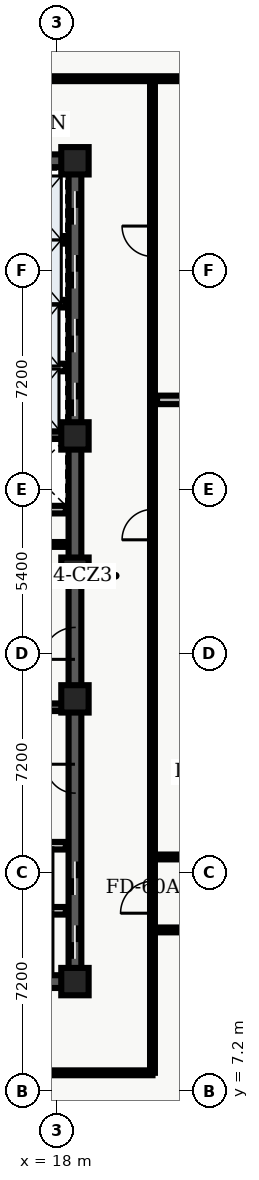
"""IFC4 building model, lengths in metres.
Left out: names, types, materials, properties, quantities, classifications, styles, units other than length and angle.
Written with IfcOpenShell. Run it as: python <this file> out.ifc"""

import sys

from ifc_helpers import new_model, entity, si_unit, converted_unit, direction, frame, origin_with_axes, origin_2d_with_axis, place, context, subcontext, project, spatial, polyline, rectangle, outline, extrude, element, fill, save


model = new_model("IFC4")
c1 = context("Model", 3, precision=1e-05, world=origin_with_axes(), true_north=direction((0.0, 1.0)))
c2 = subcontext(c1, "Body", "Model", "MODEL_VIEW")
j1 = project(units=[si_unit("LENGTHUNIT", "METRE"), converted_unit("PLANEANGLEUNIT", "DEGREE", entity("IfcPlaneAngleMeasure", 0.017), si_unit("PLANEANGLEUNIT", "RADIAN"), dimensions=[0, 0, 0, 0, 0, 0, 0])], contexts=[c1])
p1 = place(None, origin_with_axes())
s1 = spatial("IfcSite", under=j1, at=p1, CompositionType="ELEMENT")
p2 = place(p1, origin_with_axes())
s2 = spatial("IfcBuilding", under=s1, at=p2, CompositionType="ELEMENT")
p3 = place(p2, frame((0.0, 0.0, 219.9), z_axis=(0.0, 0.0, 1.0), x_axis=(1.0, 0.0, 0.0)))
s3 = spatial("IfcBuildingStorey", under=s2, at=p3, CompositionType="ELEMENT", Elevation=219.9)
p4 = place(p3, frame((11.4, 10.8, 0.0), z_axis=(0.0, 0.0, 1.0), x_axis=(1.0, 0.0, 0.0)))
e1 = element("IfcWall", 1, at=p4, inside=s3, PredefinedType="SHEAR", context=c2, shape_type="SweptSolid", body=[
    extrude(outline(polyline([(0.0, -0.21), (7.2, -0.21), (7.2, 0.21), (0.0, 0.21), (0.0, -0.21)])), origin_with_axes(), (0.0, 0.0, 1.0), 4.56),
])
p5 = place(p4, frame((2.625, 0.0, 0.0), z_axis=(0.0, 0.0, 1.0), x_axis=(1.0, 0.0, 0.0)))
e2 = element("IfcOpeningElement", 2, at=p5, cuts=e1, PredefinedType="OPENING", context=c2, shape_type="SweptSolid", body=[
    extrude(rectangle(XDim=1.05, YDim=0.44, at=origin_2d_with_axis()), origin_with_axes(), (0.0, 0.0, 1.0), 2.15),
])
p6 = place(p3, frame((11.4, 37.8, 0.0), z_axis=(0.0, 0.0, 1.0), x_axis=(1.0, 0.0, 0.0)))
e3 = element("IfcWall", 3, at=p6, inside=s3, PredefinedType="SHEAR", context=c2, shape_type="SweptSolid", body=[
    extrude(outline(polyline([(0.0, -0.21), (7.2, -0.21), (7.2, 0.21), (0.0, 0.21), (0.0, -0.21)])), origin_with_axes(), (0.0, 0.0, 1.0), 4.56),
])
p7 = place(p6, frame((2.625, 0.0, 0.0), z_axis=(0.0, 0.0, 1.0), x_axis=(1.0, 0.0, 0.0)))
e4 = element("IfcOpeningElement", 4, at=p7, cuts=e3, PredefinedType="OPENING", context=c2, shape_type="SweptSolid", body=[
    extrude(rectangle(XDim=1.05, YDim=0.44, at=origin_2d_with_axis()), origin_with_axes(), (0.0, 0.0, 1.0), 2.15),
])
p8 = place(p3, frame((18.6, 10.8, 0.0), z_axis=(0.0, 0.0, 1.0), x_axis=(0.0, 1.0, 0.0)))
e5 = element("IfcWall", 5, at=p8, inside=s3, PredefinedType="SHEAR", context=c2, shape_type="SweptSolid", body=[
    extrude(outline(polyline([(0.0, -0.21), (13.5, -0.21), (13.5, 0.21), (0.0, 0.21), (0.0, -0.21)])), origin_with_axes(), (0.0, 0.0, 1.0), 4.56),
])
p9 = place(p8, frame((1.3, 0.0, 0.0), z_axis=(0.0, 0.0, 1.0), x_axis=(1.0, 0.0, 0.0)))
e6 = element("IfcOpeningElement", 6, at=p9, cuts=e5, PredefinedType="OPENING", context=c2, shape_type="SweptSolid", body=[
    extrude(rectangle(XDim=1.1, YDim=0.44, at=origin_2d_with_axis()), origin_with_axes(), (0.0, 0.0, 1.0), 2.15),
])
p10 = place(p8, frame((3.4, 0.0, 0.0), z_axis=(0.0, 0.0, 1.0), x_axis=(1.0, 0.0, 0.0)))
e7 = element("IfcOpeningElement", 7, at=p10, cuts=e5, PredefinedType="OPENING", context=c2, shape_type="SweptSolid", body=[
    extrude(rectangle(XDim=1.1, YDim=0.44, at=origin_2d_with_axis()), origin_with_axes(), (0.0, 0.0, 1.0), 2.15),
])
p11 = place(p8, frame((11.125, 0.0, 0.0), z_axis=(0.0, 0.0, 1.0), x_axis=(1.0, 0.0, 0.0)))
e8 = element("IfcOpeningElement", 8, at=p11, cuts=e5, PredefinedType="OPENING", context=c2, shape_type="SweptSolid", body=[
    extrude(rectangle(XDim=1.05, YDim=0.44, at=origin_2d_with_axis()), origin_with_axes(), (0.0, 0.0, 1.0), 2.15),
])
p12 = place(p8, frame((6.675, 0.0, 0.0), z_axis=(0.0, 0.0, 1.0), x_axis=(1.0, 0.0, 0.0)))
e9 = element("IfcOpeningElement", 9, at=p12, cuts=e5, PredefinedType="OPENING", context=c2, shape_type="SweptSolid", body=[
    extrude(rectangle(XDim=0.95, YDim=0.44, at=origin_2d_with_axis()), origin_with_axes(), (0.0, 0.0, 1.0), 2.15),
])
p13 = place(p3, frame((18.6, 24.3, 0.0), z_axis=(0.0, 0.0, 1.0), x_axis=(0.0, 1.0, 0.0)))
e10 = element("IfcWall", 10, at=p13, inside=s3, PredefinedType="SHEAR", context=c2, shape_type="SweptSolid", body=[
    extrude(outline(polyline([(0.0, -0.21), (13.5, -0.21), (13.5, 0.21), (0.0, 0.21), (0.0, -0.21)])), origin_with_axes(), (0.0, 0.0, 1.0), 4.56),
])
p14 = place(p13, frame((5.65, 0.0, 0.0), z_axis=(0.0, 0.0, 1.0), x_axis=(1.0, 0.0, 0.0)))
e11 = element("IfcOpeningElement", 11, at=p14, cuts=e10, PredefinedType="OPENING", context=c2, shape_type="SweptSolid", body=[
    extrude(rectangle(XDim=1.1, YDim=0.44, at=origin_2d_with_axis()), origin_with_axes(), (0.0, 0.0, 1.0), 2.15),
])
p15 = place(p13, frame((7.75, 0.0, 0.0), z_axis=(0.0, 0.0, 1.0), x_axis=(1.0, 0.0, 0.0)))
e12 = element("IfcOpeningElement", 12, at=p15, cuts=e10, PredefinedType="OPENING", context=c2, shape_type="SweptSolid", body=[
    extrude(rectangle(XDim=1.1, YDim=0.44, at=origin_2d_with_axis()), origin_with_axes(), (0.0, 0.0, 1.0), 2.15),
])
p16 = place(p13, frame((9.85, 0.0, 0.0), z_axis=(0.0, 0.0, 1.0), x_axis=(1.0, 0.0, 0.0)))
e13 = element("IfcOpeningElement", 13, at=p16, cuts=e10, PredefinedType="OPENING", context=c2, shape_type="SweptSolid", body=[
    extrude(rectangle(XDim=1.1, YDim=0.44, at=origin_2d_with_axis()), origin_with_axes(), (0.0, 0.0, 1.0), 2.15),
])
p17 = place(p13, frame((11.95, 0.0, 0.0), z_axis=(0.0, 0.0, 1.0), x_axis=(1.0, 0.0, 0.0)))
e14 = element("IfcOpeningElement", 14, at=p17, cuts=e10, PredefinedType="OPENING", context=c2, shape_type="SweptSolid", body=[
    extrude(rectangle(XDim=1.1, YDim=0.44, at=origin_2d_with_axis()), origin_with_axes(), (0.0, 0.0, 1.0), 2.15),
])
for number, where, z_axis, x_axis in (
    (15, (11.61, 19.825, 0.0), (0.0, 0.0, 1.0), (1.0, 0.0, 0.0)),
    (16, (11.61, 28.775, 0.0), (0.0, 0.0, 1.0), (1.0, 0.0, 0.0)),
):
    element("IfcWall", number, at=place(p3, frame(where, z_axis=z_axis, x_axis=x_axis)), inside=s3, PredefinedType="SHEAR", context=c2, shape_type="SweptSolid", body=[
        extrude(outline(polyline([(0.0, -0.125), (6.78, -0.125), (6.78, 0.125), (0.0, 0.125), (0.0, -0.125)])), origin_with_axes(), (0.0, 0.0, 1.0), 4.56),
    ])
p18 = place(p3, frame((11.7, 24.1, 0.0), z_axis=(0.0, 0.0, 1.0), x_axis=(1.0, 0.0, 0.0)))
e17 = element("IfcWall", 17, at=p18, inside=s3, PredefinedType="SOLIDWALL", context=c2, shape_type="SweptSolid", body=[
    extrude(outline(polyline([(0.0, -0.125), (6.6, -0.125), (6.6, 0.125), (0.0, 0.125), (0.0, -0.125)])), origin_with_axes(), (0.0, 0.0, 1.0), 3.6),
])
p19 = place(p18, frame((3.75, 0.0, 0.0), z_axis=(0.0, 0.0, 1.0), x_axis=(1.0, 0.0, 0.0)))
e18 = element("IfcOpeningElement", 18, at=p19, cuts=e17, PredefinedType="OPENING", context=c2, shape_type="SweptSolid", body=[
    extrude(rectangle(XDim=0.9, YDim=0.27, at=origin_2d_with_axis()), origin_with_axes(), (0.0, 0.0, 1.0), 2.15),
])
p20 = place(p3, frame((11.7, 26.325, 0.0), z_axis=(0.0, 0.0, 1.0), x_axis=(1.0, 0.0, 0.0)))
e19 = element("IfcWall", 19, at=p20, inside=s3, PredefinedType="SOLIDWALL", context=c2, shape_type="SweptSolid", body=[
    extrude(outline(polyline([(0.0, -0.125), (6.6, -0.125), (6.6, 0.125), (0.0, 0.125), (0.0, -0.125)])), origin_with_axes(), (0.0, 0.0, 1.0), 3.6),
])
p21 = place(p20, frame((3.5, 0.0, 0.0), z_axis=(0.0, 0.0, 1.0), x_axis=(1.0, 0.0, 0.0)))
e20 = element("IfcOpeningElement", 20, at=p21, cuts=e19, PredefinedType="OPENING", context=c2, shape_type="SweptSolid", body=[
    extrude(rectangle(XDim=0.9, YDim=0.27, at=origin_2d_with_axis()), origin_with_axes(), (0.0, 0.0, 1.0), 2.15),
])
for number, where, z_axis, x_axis in (
    (21, (18.6, 10.8, 0.0), (0.0, 0.0, 1.0), (1.0, 0.0, 0.0)),
    (22, (18.6, 20.1, 0.0), (0.0, 0.0, 1.0), (1.0, 0.0, 0.0)),
    (23, (18.6, 24.3, 0.0), (0.0, 0.0, 1.0), (1.0, 0.0, 0.0)),
    (24, (18.6, 28.75, 0.0), (0.0, 0.0, 1.0), (1.0, 0.0, 0.0)),
    (25, (18.6, 37.8, 0.0), (0.0, 0.0, 1.0), (1.0, 0.0, 0.0)),
):
    element("IfcColumn", number, at=place(p3, frame(where, z_axis=z_axis, x_axis=x_axis)), inside=s3, PredefinedType="COLUMN", context=c2, shape_type="SweptSolid", body=[
        extrude(rectangle(XDim=0.9, YDim=0.9, at=origin_2d_with_axis()), origin_with_axes(), (0.0, 0.0, 1.0), 4.8),
    ])
p22 = place(p3, frame((14.62, 25.18, 0.0), z_axis=(0.0, 0.0, 1.0), x_axis=(1.0, 0.0, 0.0)))
e26 = element("IfcWall", 26, at=p22, inside=s3, PredefinedType="PARTITIONING", context=c2, shape_type="SweptSolid", body=[
    extrude(outline(polyline([(0.0, -0.08), (3.68, -0.08), (3.68, 0.08), (0.0, 0.08), (0.0, -0.08)])), origin_with_axes(), (0.0, 0.0, 1.0), 3.2),
])
p23 = place(p22, frame((1.95, 0.0, 0.0), z_axis=(0.0, 0.0, 1.0), x_axis=(1.0, 0.0, 0.0)))
e27 = element("IfcOpeningElement", 27, at=p23, cuts=e26, PredefinedType="OPENING", context=c2, shape_type="SweptSolid", body=[
    extrude(rectangle(XDim=0.9, YDim=0.18, at=origin_2d_with_axis()), origin_with_axes(), (0.0, 0.0, 1.0), 2.15),
])
for number, where, z_axis, x_axis in (
    (28, (15.84, 13.13, 0.0), (0.0, 0.0, 1.0), (1.0, 0.0, 0.0)),
    (29, (15.84, 15.27, 0.0), (0.0, 0.0, 1.0), (1.0, 0.0, 0.0)),
    (30, (15.84, 31.0, 0.0), (0.0, 0.0, 1.0), (1.0, 0.0, 0.0)),
    (31, (15.84, 33.1, 0.0), (0.0, 0.0, 1.0), (1.0, 0.0, 0.0)),
    (32, (15.84, 35.2, 0.0), (0.0, 0.0, 1.0), (1.0, 0.0, 0.0)),
):
    element("IfcWall", number, at=place(p3, frame(where, z_axis=z_axis, x_axis=x_axis)), inside=s3, PredefinedType="SOLIDWALL", context=c2, shape_type="SweptSolid", body=[
        extrude(outline(polyline([(0.0, -0.125), (2.46, -0.125), (2.46, 0.125), (0.0, 0.125), (0.0, -0.125)])), origin_with_axes(), (0.0, 0.0, 1.0), 3.2),
    ])
p24 = place(p3, frame((7.1, 7.8, 0.0), z_axis=(0.0, 0.0, 1.0), x_axis=(1.0, 0.0, 0.0)))
e33 = element("IfcWall", 33, at=p24, inside=s3, PredefinedType="PARTITIONING", context=c2, shape_type="SweptSolid", body=[
    extrude(outline(polyline([(0.0, -0.08), (14.05, -0.08), (14.05, 0.08), (0.0, 0.08), (0.0, -0.08)])), origin_with_axes(), (0.0, 0.0, 1.0), 3.2),
])
p25 = place(p24, frame((3.051, 0.0, 0.0), z_axis=(0.0, 0.0, 1.0), x_axis=(1.0, 0.0, 0.0)))
e34 = element("IfcOpeningElement", 34, at=p25, cuts=e33, PredefinedType="OPENING", context=c2, shape_type="SweptSolid", body=[
    extrude(rectangle(XDim=1.0, YDim=0.18, at=origin_2d_with_axis()), origin_with_axes(), (0.0, 0.0, 1.0), 2.15),
])
p26 = place(p24, frame((10.056, 0.0, 0.0), z_axis=(0.0, 0.0, 1.0), x_axis=(1.0, 0.0, 0.0)))
e35 = element("IfcOpeningElement", 35, at=p26, cuts=e33, PredefinedType="OPENING", context=c2, shape_type="SweptSolid", body=[
    extrude(rectangle(XDim=1.0, YDim=0.18, at=origin_2d_with_axis()), origin_with_axes(), (0.0, 0.0, 1.0), 2.15),
])
p27 = place(p3, frame((7.1, 40.5, 0.0), z_axis=(0.0, 0.0, 1.0), x_axis=(1.0, 0.0, 0.0)))
e36 = element("IfcWall", 36, at=p27, inside=s3, PredefinedType="PARTITIONING", context=c2, shape_type="SweptSolid", body=[
    extrude(outline(polyline([(0.0, -0.08), (24.965, -0.08), (24.965, 0.08), (0.0, 0.08), (0.0, -0.08)])), origin_with_axes(), (0.0, 0.0, 1.0), 3.2),
])
p28 = place(p27, frame((3.395, 0.0, 0.0), z_axis=(0.0, 0.0, 1.0), x_axis=(1.0, 0.0, 0.0)))
e37 = element("IfcOpeningElement", 37, at=p28, cuts=e36, PredefinedType="OPENING", context=c2, shape_type="SweptSolid", body=[
    extrude(rectangle(XDim=1.0, YDim=0.18, at=origin_2d_with_axis()), origin_with_axes(), (0.0, 0.0, 1.0), 2.15),
])
p29 = place(p27, frame((8.66, 0.0, 0.0), z_axis=(0.0, 0.0, 1.0), x_axis=(1.0, 0.0, 0.0)))
e38 = element("IfcOpeningElement", 38, at=p29, cuts=e36, PredefinedType="OPENING", context=c2, shape_type="SweptSolid", body=[
    extrude(rectangle(XDim=1.0, YDim=0.18, at=origin_2d_with_axis()), origin_with_axes(), (0.0, 0.0, 1.0), 2.15),
])
p30 = place(p3, frame((21.15, 7.8, 0.0), z_axis=(0.0, 0.0, 1.0), x_axis=(0.0, 1.0, 0.0)))
e39 = element("IfcWall", 39, at=p30, inside=s3, PredefinedType="PARTITIONING", context=c2, shape_type="SweptSolid", body=[
    extrude(outline(polyline([(0.0, -0.08), (32.7, -0.08), (32.7, 0.08), (0.0, 0.08), (0.0, -0.08)])), origin_with_axes(), (0.0, 0.0, 1.0), 3.2),
])
p31 = place(p30, frame((18.032, 0.0, 0.0), z_axis=(0.0, 0.0, 1.0), x_axis=(1.0, 0.0, 0.0)))
e40 = element("IfcOpeningElement", 40, at=p31, cuts=e39, PredefinedType="OPENING", context=c2, shape_type="SweptSolid", body=[
    extrude(rectangle(XDim=1.0, YDim=0.18, at=origin_2d_with_axis()), origin_with_axes(), (0.0, 0.0, 1.0), 2.15),
])
p32 = place(p30, frame((27.352, 0.0, 0.0), z_axis=(0.0, 0.0, 1.0), x_axis=(1.0, 0.0, 0.0)))
e41 = element("IfcOpeningElement", 41, at=p32, cuts=e39, PredefinedType="OPENING", context=c2, shape_type="SweptSolid", body=[
    extrude(rectangle(XDim=1.0, YDim=0.18, at=origin_2d_with_axis()), origin_with_axes(), (0.0, 0.0, 1.0), 2.15),
])
p33 = place(p30, frame((5.775, 0.0, 0.0), z_axis=(0.0, 0.0, 1.0), x_axis=(1.0, 0.0, 0.0)))
e42 = element("IfcOpeningElement", 42, at=p33, cuts=e39, PredefinedType="OPENING", context=c2, shape_type="SweptSolid", body=[
    extrude(rectangle(XDim=1.05, YDim=0.18, at=origin_2d_with_axis()), origin_with_axes(), (0.0, 0.0, 1.0), 2.15),
])
p34 = place(p3, frame((21.3, 29.935, 0.0), z_axis=(0.0, 0.0, 1.0), x_axis=(1.0, 0.0, 0.0)))
e43 = element("IfcWall", 43, at=p34, inside=s3, PredefinedType="PARTITIONING", context=c2, shape_type="SweptSolid", body=[
    extrude(outline(polyline([(0.0, -0.14), (10.765, -0.14), (10.765, 0.14), (0.0, 0.14), (0.0, -0.14)])), origin_with_axes(), (0.0, 0.0, 1.0), 3.2),
])
p35 = place(p3, frame((21.15, 12.5, 0.0), z_axis=(0.0, 0.0, 1.0), x_axis=(1.0, 0.0, 0.0)))
e44 = element("IfcWall", 44, at=p35, inside=s3, PredefinedType="PARTITIONING", context=c2, shape_type="SweptSolid", body=[
    extrude(outline(polyline([(0.0, -0.08), (15.2, -0.08), (15.2, 0.08), (0.0, 0.08), (0.0, -0.08)])), origin_with_axes(), (0.0, 0.0, 1.0), 3.2),
])
p36 = place(p35, frame((7.65, 0.0, 0.0), z_axis=(0.0, 0.0, 1.0), x_axis=(1.0, 0.0, 0.0)))
e45 = element("IfcOpeningElement", 45, at=p36, cuts=e44, PredefinedType="OPENING", context=c2, shape_type="SweptSolid", body=[
    extrude(rectangle(XDim=1.0, YDim=0.18, at=origin_2d_with_axis()), origin_with_axes(), (0.0, 0.0, 1.0), 2.15),
])
p37 = place(p3, frame((21.15, 14.9, 0.0), z_axis=(0.0, 0.0, 1.0), x_axis=(1.0, 0.0, 0.0)))
e46 = element("IfcWall", 46, at=p37, inside=s3, PredefinedType="PARTITIONING", context=c2, shape_type="SweptSolid", body=[
    extrude(outline(polyline([(0.0, -0.08), (15.2, -0.08), (15.2, 0.08), (0.0, 0.08), (0.0, -0.08)])), origin_with_axes(), (0.0, 0.0, 1.0), 3.2),
])
p38 = place(p37, frame((3.583, 0.0, 0.0), z_axis=(0.0, 0.0, 1.0), x_axis=(1.0, 0.0, 0.0)))
e47 = element("IfcOpeningElement", 47, at=p38, cuts=e46, PredefinedType="OPENING", context=c2, shape_type="SweptSolid", body=[
    extrude(rectangle(XDim=1.0, YDim=0.18, at=origin_2d_with_axis()), origin_with_axes(), (0.0, 0.0, 1.0), 2.15),
])
p39 = place(p37, frame((11.053, 0.0, 0.0), z_axis=(0.0, 0.0, 1.0), x_axis=(1.0, 0.0, 0.0)))
e48 = element("IfcOpeningElement", 48, at=p39, cuts=e46, PredefinedType="OPENING", context=c2, shape_type="SweptSolid", body=[
    extrude(rectangle(XDim=1.0, YDim=0.18, at=origin_2d_with_axis()), origin_with_axes(), (0.0, 0.0, 1.0), 2.15),
])
p40 = place(p13, frame((5.65, 0.0, 0.0), z_axis=(0.0, 0.0, 1.0), x_axis=(1.0, 0.0, 0.0)))
e49 = element("IfcDoor", 49, at=p40, inside=s3, OperationType="SLIDING_TO_LEFT", PredefinedType="DOOR", context=c2, shape_type="SweptSolid", body=[
    extrude(rectangle(XDim=1.1, YDim=0.09, at=origin_2d_with_axis()), origin_with_axes(), (0.0, 0.0, 1.0), 2.15),
])
fill(e11, e49)
p41 = place(p13, frame((7.75, 0.0, 0.0), z_axis=(0.0, 0.0, 1.0), x_axis=(1.0, 0.0, 0.0)))
e50 = element("IfcDoor", 50, at=p41, inside=s3, OperationType="SLIDING_TO_RIGHT", PredefinedType="DOOR", context=c2, shape_type="SweptSolid", body=[
    extrude(rectangle(XDim=1.1, YDim=0.09, at=origin_2d_with_axis()), origin_with_axes(), (0.0, 0.0, 1.0), 2.15),
])
fill(e12, e50)
p42 = place(p13, frame((9.85, 0.0, 0.0), z_axis=(0.0, 0.0, 1.0), x_axis=(1.0, 0.0, 0.0)))
e51 = element("IfcDoor", 51, at=p42, inside=s3, OperationType="DOUBLE_DOOR_SLIDING", PredefinedType="DOOR", context=c2, shape_type="SweptSolid", body=[
    extrude(rectangle(XDim=1.1, YDim=0.09, at=origin_2d_with_axis()), origin_with_axes(), (0.0, 0.0, 1.0), 2.15),
])
fill(e13, e51)
p43 = place(p13, frame((11.95, 0.0, 0.0), z_axis=(0.0, 0.0, 1.0), x_axis=(1.0, 0.0, 0.0)))
e52 = element("IfcDoor", 52, at=p43, inside=s3, OperationType="DOUBLE_DOOR_SLIDING", PredefinedType="DOOR", context=c2, shape_type="SweptSolid", body=[
    extrude(rectangle(XDim=1.1, YDim=0.09, at=origin_2d_with_axis()), origin_with_axes(), (0.0, 0.0, 1.0), 2.15),
])
fill(e14, e52)
p44 = place(p8, frame((1.3, 0.0, 0.0), z_axis=(0.0, 0.0, 1.0), x_axis=(1.0, 0.0, 0.0)))
e53 = element("IfcDoor", 53, at=p44, inside=s3, OperationType="SLIDING_TO_LEFT", PredefinedType="DOOR", context=c2, shape_type="SweptSolid", body=[
    extrude(rectangle(XDim=1.1, YDim=0.09, at=origin_2d_with_axis()), origin_with_axes(), (0.0, 0.0, 1.0), 2.15),
])
fill(e6, e53)
p45 = place(p8, frame((3.4, 0.0, 0.0), z_axis=(0.0, 0.0, 1.0), x_axis=(1.0, 0.0, 0.0)))
e54 = element("IfcDoor", 54, at=p45, inside=s3, OperationType="SLIDING_TO_RIGHT", PredefinedType="DOOR", context=c2, shape_type="SweptSolid", body=[
    extrude(rectangle(XDim=1.1, YDim=0.09, at=origin_2d_with_axis()), origin_with_axes(), (0.0, 0.0, 1.0), 2.15),
])
fill(e7, e54)
p46 = place(p8, frame((11.125, 0.0, 0.0), z_axis=(0.0, 0.0, 1.0), x_axis=(1.0, 0.0, 0.0)))
e55 = element("IfcDoor", 55, at=p46, inside=s3, OperationType="SINGLE_SWING_LEFT", PredefinedType="DOOR", context=c2, shape_type="SweptSolid", body=[
    extrude(rectangle(XDim=1.05, YDim=0.09, at=origin_2d_with_axis()), origin_with_axes(), (0.0, 0.0, 1.0), 2.15),
])
fill(e8, e55)
p47 = place(p8, frame((6.675, 0.0, 0.0), z_axis=(0.0, 0.0, 1.0), x_axis=(1.0, 0.0, 0.0)))
e56 = element("IfcDoor", 56, at=p47, inside=s3, OperationType="SINGLE_SWING_RIGHT", PredefinedType="DOOR", context=c2, shape_type="SweptSolid", body=[
    extrude(rectangle(XDim=0.95, YDim=0.09, at=origin_2d_with_axis()), origin_with_axes(), (0.0, 0.0, 1.0), 2.15),
])
fill(e9, e56)
p48 = place(p30, frame((18.032, 0.0, 0.0), z_axis=(0.0, 0.0, 1.0), x_axis=(1.0, 0.0, 0.0)))
e57 = element("IfcDoor", 57, at=p48, inside=s3, OperationType="SINGLE_SWING_LEFT", PredefinedType="DOOR", context=c2, shape_type="SweptSolid", body=[
    extrude(rectangle(XDim=1.0, YDim=0.09, at=origin_2d_with_axis()), origin_with_axes(), (0.0, 0.0, 1.0), 2.15),
])
fill(e40, e57)
p49 = place(p30, frame((27.352, 0.0, 0.0), z_axis=(0.0, 0.0, 1.0), x_axis=(1.0, 0.0, 0.0)))
e58 = element("IfcDoor", 58, at=p49, inside=s3, OperationType="SINGLE_SWING_RIGHT", PredefinedType="DOOR", context=c2, shape_type="SweptSolid", body=[
    extrude(rectangle(XDim=1.0, YDim=0.09, at=origin_2d_with_axis()), origin_with_axes(), (0.0, 0.0, 1.0), 2.15),
])
fill(e41, e58)
p50 = place(p30, frame((5.775, 0.0, 0.0), z_axis=(0.0, 0.0, 1.0), x_axis=(1.0, 0.0, 0.0)))
e59 = element("IfcDoor", 59, at=p50, inside=s3, OperationType="SINGLE_SWING_LEFT", PredefinedType="DOOR", context=c2, shape_type="SweptSolid", body=[
    extrude(rectangle(XDim=1.05, YDim=0.09, at=origin_2d_with_axis()), origin_with_axes(), (0.0, 0.0, 1.0), 2.15),
])
fill(e42, e59)
save(model, sys.argv[1])
